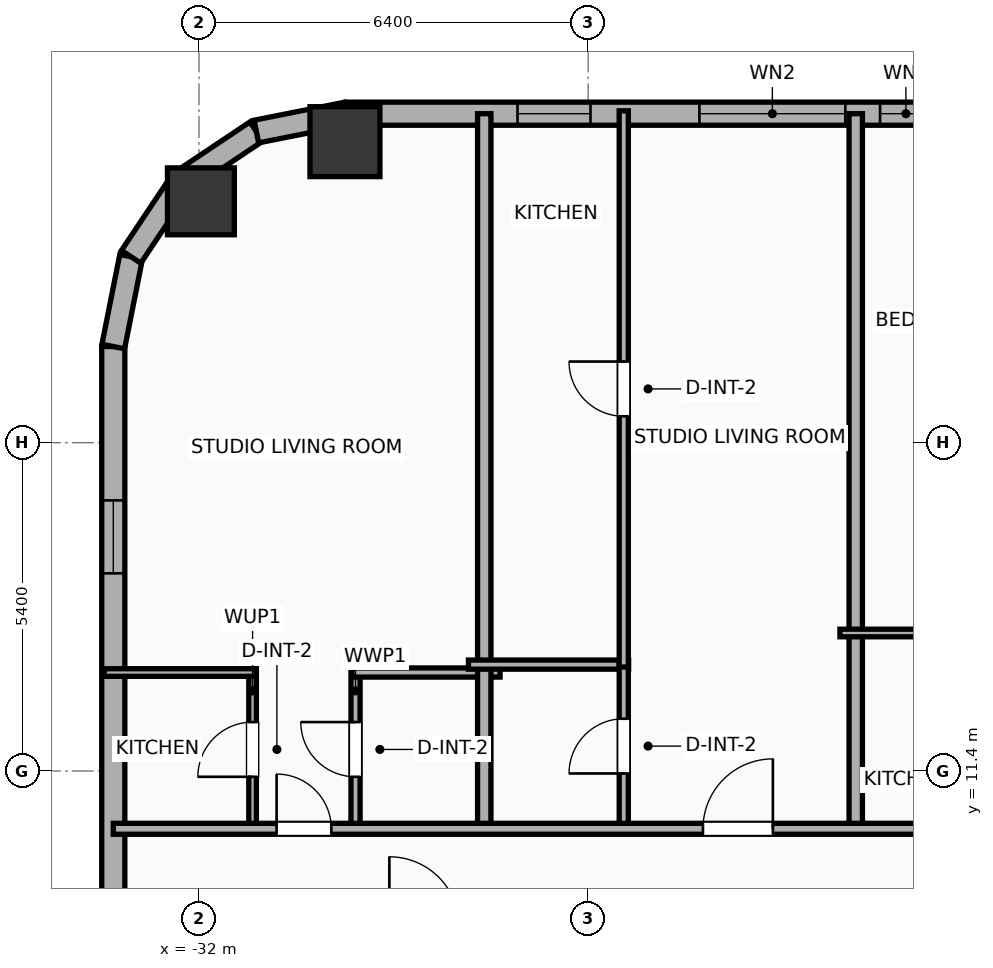
"""IFC4 building model, lengths in metres.
Left out: names, types, materials, properties, quantities, classifications, styles, units other than length and angle.
Written with IfcOpenShell. Run it as: python <this file> out.ifc"""

import sys

from ifc_helpers import new_model, si_unit, direction, frame, frame_2d, origin, origin_2d, place, context, subcontext, project, spatial, rectangle, hollow_rectangle, hollow_circle, extrude, element, fill, save


model = new_model("IFC4")
c1 = context("Model", 3, precision=1e-05, world=origin(), true_north=direction((0.0, 1.0)))
c2 = subcontext(c1, "Body", "Model", "MODEL_VIEW")
j1 = project(units=[si_unit("LENGTHUNIT", "METRE"), si_unit("PLANEANGLEUNIT", "RADIAN")], contexts=[c1])
p1 = place(None, origin())
s1 = spatial("IfcSite", under=j1, at=p1, CompositionType="ELEMENT")
p2 = place(p1, origin())
s2 = spatial("IfcBuilding", under=s1, at=p2, CompositionType="ELEMENT")
p3 = place(p2, frame((0.0, 0.0, 72.8)))
s3 = spatial("IfcBuildingStorey", under=s2, at=p3, CompositionType="ELEMENT", Elevation=72.8)
p4 = place(p3, frame((-29.6, 21.75, 0.0), z_axis=(0.0, 0.0, 1.0), x_axis=(1.0, 0.0, 0.0)))
e1 = element("IfcColumn", 1, at=p4, inside=s3, PredefinedType="COLUMN", context=c2, shape_type="SweptSolid", body=[
    extrude(hollow_rectangle(XDim=1.15, YDim=1.15, WallThickness=0.04, at=origin_2d()), origin(), (0.0, 0.0, 1.0), 3.9),
])
p5 = place(p3, frame((-31.969, 20.769, 0.0), z_axis=(0.0, 0.0, 1.0), x_axis=(1.0, 0.0, 0.0)))
e2 = element("IfcColumn", 2, at=p5, inside=s3, PredefinedType="COLUMN", context=c2, shape_type="SweptSolid", body=[
    extrude(hollow_circle(Radius=0.55, WallThickness=0.036, at=origin_2d()), origin(), (0.0, 0.0, 1.0), 3.9),
])
p6 = place(p3, frame((-33.41, -18.381, 0.0), z_axis=(0.0, 0.0, 1.0), x_axis=(0.0, 1.0, 0.0)))
e3 = element("IfcWall", 3, at=p6, inside=s3, PredefinedType="ELEMENTEDWALL", context=c2, shape_type="SweptSolid", body=[
    extrude(rectangle(XDim=36.763, YDim=0.38, at=frame_2d((18.381, 0.0))), origin(), (0.0, 0.0, 1.0), 3.65),
])
p7 = place(p6, frame((33.032, 0.0, 0.75)))
e4 = element("IfcOpeningElement", 4, at=p7, cuts=e3, PredefinedType="OPENING", context=c2, shape_type="SweptSolid", body=[
    extrude(rectangle(XDim=1.2, YDim=2.05, at=frame_2d((0.6, 1.025))), frame((0.0, 0.2, 0.0), z_axis=(0.0, -1.0, 0.0), x_axis=(1.0, 0.0, 0.0)), (0.0, 0.0, 1.0), 0.4),
])
p8 = place(p6, frame((22.301, 0.0, 0.75)))
e5 = element("IfcOpeningElement", 5, at=p8, cuts=e3, PredefinedType="OPENING", context=c2, shape_type="SweptSolid", body=[
    extrude(rectangle(XDim=1.2, YDim=2.05, at=frame_2d((0.6, 1.025))), frame((0.0, 0.2, 0.0), z_axis=(0.0, -1.0, 0.0), x_axis=(1.0, 0.0, 0.0)), (0.0, 0.0, 1.0), 0.4),
])
p9 = place(p6, frame((13.401, 0.0, 0.75)))
e6 = element("IfcOpeningElement", 6, at=p9, cuts=e3, PredefinedType="OPENING", context=c2, shape_type="SweptSolid", body=[
    extrude(rectangle(XDim=1.2, YDim=2.05, at=frame_2d((0.6, 1.025))), frame((0.0, 0.2, 0.0), z_axis=(0.0, -1.0, 0.0), x_axis=(1.0, 0.0, 0.0)), (0.0, 0.0, 1.0), 0.4),
])
p10 = place(p3, frame((-33.41, 18.381, 0.0), z_axis=(0.0, 0.0, 1.0), x_axis=(0.195086038585, 0.980786132421, 0.0)))
e7 = element("IfcWall", 7, at=p10, inside=s3, PredefinedType="ELEMENTEDWALL", context=c2, shape_type="SweptSolid", body=[
    extrude(rectangle(XDim=1.504, YDim=0.38, at=frame_2d((0.752, 0.0))), origin(), (0.0, 0.0, 1.0), 3.65),
])
p11 = place(p3, frame((-33.116, 19.857, 0.0), z_axis=(0.0, 0.0, 1.0), x_axis=(0.555572577804, 0.831468045563, 0.0)))
e8 = element("IfcWall", 8, at=p11, inside=s3, PredefinedType="ELEMENTEDWALL", context=c2, shape_type="SweptSolid", body=[
    extrude(rectangle(XDim=1.485, YDim=0.38, at=frame_2d((0.742, 0.0))), origin(), (0.0, 0.0, 1.0), 3.65),
])
p12 = place(p3, frame((-32.292, 21.091, 0.0), z_axis=(0.0, 0.0, 1.0), x_axis=(0.831442848281, 0.555610286119, 0.0)))
e9 = element("IfcWall", 9, at=p12, inside=s3, PredefinedType="ELEMENTEDWALL", context=c2, shape_type="SweptSolid", body=[
    extrude(rectangle(XDim=1.485, YDim=0.38, at=frame_2d((0.743, 0.0))), origin(), (0.0, 0.0, 1.0), 3.65),
])
p13 = place(p3, frame((-31.057, 21.917, 0.0), z_axis=(0.0, 0.0, 1.0), x_axis=(0.980786132421, 0.195086038585, 0.0)))
e10 = element("IfcWall", 10, at=p13, inside=s3, PredefinedType="ELEMENTEDWALL", context=c2, shape_type="SweptSolid", body=[
    extrude(rectangle(XDim=1.504, YDim=0.38, at=frame_2d((0.752, 0.0))), origin(), (0.0, 0.0, 1.0), 3.65),
])
p14 = place(p3, frame((-29.581, 22.21, 0.0), z_axis=(0.0, 0.0, 1.0), x_axis=(1.0, 0.0, 0.0)))
e11 = element("IfcWall", 11, at=p14, inside=s3, PredefinedType="ELEMENTEDWALL", context=c2, shape_type="SweptSolid", body=[
    extrude(rectangle(XDim=51.963, YDim=0.38, at=frame_2d((25.981, 0.0))), origin(), (0.0, 0.0, 1.0), 3.65),
])
p15 = place(p14, frame((5.81, 0.0, 0.75)))
e12 = element("IfcOpeningElement", 12, at=p15, cuts=e11, PredefinedType="OPENING", context=c2, shape_type="SweptSolid", body=[
    extrude(rectangle(XDim=2.4, YDim=2.1, at=frame_2d((1.2, 1.05))), frame((0.0, 0.2, 0.0), z_axis=(0.0, -1.0, 0.0), x_axis=(1.0, 0.0, 0.0)), (0.0, 0.0, 1.0), 0.4),
])
p16 = place(p14, frame((23.131, 0.0, 0.75)))
e13 = element("IfcOpeningElement", 13, at=p16, cuts=e11, PredefinedType="OPENING", context=c2, shape_type="SweptSolid", body=[
    extrude(rectangle(XDim=2.4, YDim=2.1, at=frame_2d((1.2, 1.05))), frame((0.0, 0.2, 0.0), z_axis=(0.0, -1.0, 0.0), x_axis=(1.0, 0.0, 0.0)), (0.0, 0.0, 1.0), 0.4),
])
p17 = place(p14, frame((43.752, 0.0, 0.75)))
e14 = element("IfcOpeningElement", 14, at=p17, cuts=e11, PredefinedType="OPENING", context=c2, shape_type="SweptSolid", body=[
    extrude(rectangle(XDim=2.4, YDim=2.1, at=frame_2d((1.2, 1.05))), frame((0.0, 0.2, 0.0), z_axis=(0.0, -1.0, 0.0), x_axis=(1.0, 0.0, 0.0)), (0.0, 0.0, 1.0), 0.4),
])
p18 = place(p14, frame((2.819, 0.0, 0.75)))
e15 = element("IfcOpeningElement", 15, at=p18, cuts=e11, PredefinedType="OPENING", context=c2, shape_type="SweptSolid", body=[
    extrude(rectangle(XDim=1.2, YDim=2.05, at=frame_2d((0.6, 1.025))), frame((0.0, 0.2, 0.0), z_axis=(0.0, -1.0, 0.0), x_axis=(1.0, 0.0, 0.0)), (0.0, 0.0, 1.0), 0.4),
])
p19 = place(p14, frame((11.781, 0.0, 0.75)))
e16 = element("IfcOpeningElement", 16, at=p19, cuts=e11, PredefinedType="OPENING", context=c2, shape_type="SweptSolid", body=[
    extrude(rectangle(XDim=1.2, YDim=2.05, at=frame_2d((0.6, 1.025))), frame((0.0, 0.2, 0.0), z_axis=(0.0, -1.0, 0.0), x_axis=(1.0, 0.0, 0.0)), (0.0, 0.0, 1.0), 0.4),
])
p20 = place(p14, frame((8.781, 0.0, 0.75)))
e17 = element("IfcOpeningElement", 17, at=p20, cuts=e11, PredefinedType="OPENING", context=c2, shape_type="SweptSolid", body=[
    extrude(rectangle(XDim=0.85, YDim=2.05, at=frame_2d((0.425, 1.025))), frame((0.0, 0.2, 0.0), z_axis=(0.0, -1.0, 0.0), x_axis=(1.0, 0.0, 0.0)), (0.0, 0.0, 1.0), 0.4),
])
p21 = place(p14, frame((14.876, 0.0, 0.75)))
e18 = element("IfcOpeningElement", 18, at=p21, cuts=e11, PredefinedType="OPENING", context=c2, shape_type="SweptSolid", body=[
    extrude(rectangle(XDim=1.2, YDim=2.05, at=frame_2d((0.6, 1.025))), frame((0.0, 0.2, 0.0), z_axis=(0.0, -1.0, 0.0), x_axis=(1.0, 0.0, 0.0)), (0.0, 0.0, 1.0), 0.4),
])
p22 = place(p14, frame((21.521, 0.0, 0.75)))
e19 = element("IfcOpeningElement", 19, at=p22, cuts=e11, PredefinedType="OPENING", context=c2, shape_type="SweptSolid", body=[
    extrude(rectangle(XDim=0.52, YDim=2.05, at=frame_2d((0.26, 1.025))), frame((0.0, 0.2, 0.0), z_axis=(0.0, -1.0, 0.0), x_axis=(1.0, 0.0, 0.0)), (0.0, 0.0, 1.0), 0.4),
])
p23 = place(p14, frame((17.886, 0.0, 0.75)))
e20 = element("IfcOpeningElement", 20, at=p23, cuts=e11, PredefinedType="OPENING", context=c2, shape_type="SweptSolid", body=[
    extrude(rectangle(XDim=1.2, YDim=2.05, at=frame_2d((0.6, 1.025))), frame((0.0, 0.2, 0.0), z_axis=(0.0, -1.0, 0.0), x_axis=(1.0, 0.0, 0.0)), (0.0, 0.0, 1.0), 0.4),
])
p24 = place(p14, frame((26.736, 0.0, 0.75)))
e21 = element("IfcOpeningElement", 21, at=p24, cuts=e11, PredefinedType="OPENING", context=c2, shape_type="SweptSolid", body=[
    extrude(rectangle(XDim=1.2, YDim=2.05, at=frame_2d((0.6, 1.025))), frame((0.0, 0.2, 0.0), z_axis=(0.0, -1.0, 0.0), x_axis=(1.0, 0.0, 0.0)), (0.0, 0.0, 1.0), 0.4),
])
p25 = place(p14, frame((31.976, 0.0, 0.75)))
e22 = element("IfcOpeningElement", 22, at=p25, cuts=e11, PredefinedType="OPENING", context=c2, shape_type="SweptSolid", body=[
    extrude(rectangle(XDim=1.2, YDim=2.05, at=frame_2d((0.6, 1.025))), frame((0.0, 0.2, 0.0), z_axis=(0.0, -1.0, 0.0), x_axis=(1.0, 0.0, 0.0)), (0.0, 0.0, 1.0), 0.4),
])
p26 = place(p14, frame((38.181, 0.0, 0.75)))
e23 = element("IfcOpeningElement", 23, at=p26, cuts=e11, PredefinedType="OPENING", context=c2, shape_type="SweptSolid", body=[
    extrude(rectangle(XDim=1.2, YDim=2.05, at=frame_2d((0.6, 1.025))), frame((0.0, 0.2, 0.0), z_axis=(0.0, -1.0, 0.0), x_axis=(1.0, 0.0, 0.0)), (0.0, 0.0, 1.0), 0.4),
])
p27 = place(p14, frame((35.486, 0.0, 0.75)))
e24 = element("IfcOpeningElement", 24, at=p27, cuts=e11, PredefinedType="OPENING", context=c2, shape_type="SweptSolid", body=[
    extrude(rectangle(XDim=1.2, YDim=2.05, at=frame_2d((0.6, 1.025))), frame((0.0, 0.2, 0.0), z_axis=(0.0, -1.0, 0.0), x_axis=(1.0, 0.0, 0.0)), (0.0, 0.0, 1.0), 0.4),
])
p28 = place(p14, frame((42.411, 0.0, 0.75)))
e25 = element("IfcOpeningElement", 25, at=p28, cuts=e11, PredefinedType="OPENING", context=c2, shape_type="SweptSolid", body=[
    extrude(rectangle(XDim=0.85, YDim=2.05, at=frame_2d((0.425, 1.025))), frame((0.0, 0.2, 0.0), z_axis=(0.0, -1.0, 0.0), x_axis=(1.0, 0.0, 0.0)), (0.0, 0.0, 1.0), 0.4),
])
p29 = place(p14, frame((47.943, 0.0, 0.75)))
e26 = element("IfcOpeningElement", 26, at=p29, cuts=e11, PredefinedType="OPENING", context=c2, shape_type="SweptSolid", body=[
    extrude(rectangle(XDim=1.2, YDim=2.05, at=frame_2d((0.6, 1.025))), frame((0.0, 0.2, 0.0), z_axis=(0.0, -1.0, 0.0), x_axis=(1.0, 0.0, 0.0)), (0.0, 0.0, 1.0), 0.4),
])
p30 = place(p14, frame((49.901, 0.0, 0.75)))
e27 = element("IfcOpeningElement", 27, at=p30, cuts=e11, PredefinedType="OPENING", context=c2, shape_type="SweptSolid", body=[
    extrude(rectangle(XDim=1.2, YDim=2.05, at=frame_2d((0.6, 1.025))), frame((0.0, 0.2, 0.0), z_axis=(0.0, -1.0, 0.0), x_axis=(1.0, 0.0, 0.0)), (0.0, 0.0, 1.0), 0.4),
])
p31 = place(p3, frame((-31.119, 10.43, 0.0), z_axis=(0.0, 0.0, 1.0), x_axis=(0.0, 1.0, 0.0)))
e28 = element("IfcWall", 28, at=p31, inside=s3, PredefinedType="PARTITIONING", context=c2, shape_type="SweptSolid", body=[
    extrude(rectangle(XDim=2.65, YDim=0.125, at=frame_2d((1.325, 0.0))), origin(), (0.0, 0.0, 1.0), 3.65),
])
p32 = place(p31, frame((0.875, 0.0, 0.0)))
e29 = element("IfcOpeningElement", 29, at=p32, cuts=e28, PredefinedType="OPENING", context=c2, shape_type="SweptSolid", body=[
    extrude(rectangle(XDim=0.9, YDim=2.05, at=frame_2d((0.45, 1.025))), frame((0.0, 0.073, 0.0), z_axis=(0.0, -1.0, 0.0), x_axis=(1.0, 0.0, 0.0)), (0.0, 0.0, 1.0), 0.145),
])
p33 = place(p3, frame((-29.426, 10.43, 0.0), z_axis=(0.0, 0.0, 1.0), x_axis=(0.0, 1.0, 0.0)))
e30 = element("IfcWall", 30, at=p33, inside=s3, PredefinedType="PLUMBINGWALL", context=c2, shape_type="SweptSolid", body=[
    extrude(rectangle(XDim=2.65, YDim=0.15, at=frame_2d((1.325, 0.0))), origin(), (0.0, 0.0, 1.0), 3.65),
])
p34 = place(p33, frame((0.875, 0.0, 0.0)))
e31 = element("IfcOpeningElement", 31, at=p34, cuts=e30, PredefinedType="OPENING", context=c2, shape_type="SweptSolid", body=[
    extrude(rectangle(XDim=0.9, YDim=2.05, at=frame_2d((0.45, 1.025))), frame((0.0, 0.085, 0.0), z_axis=(0.0, -1.0, 0.0), x_axis=(1.0, 0.0, 0.0)), (0.0, 0.0, 1.0), 0.17),
])
p35 = place(p3, frame((-33.56, 13.02, 0.0), z_axis=(0.0, 0.0, 1.0), x_axis=(1.0, 0.0, 0.0)))
e32 = element("IfcWall", 32, at=p35, inside=s3, PredefinedType="PARTITIONING", context=c2, shape_type="SweptSolid", body=[
    extrude(rectangle(XDim=2.501, YDim=0.125, at=frame_2d((1.25, 0.0))), origin(), (0.0, 0.0, 1.0), 3.65),
])
p36 = place(p3, frame((-29.486, 13.02, 0.0), z_axis=(0.0, 0.0, 1.0), x_axis=(1.0, 0.0, 0.0)))
e33 = element("IfcWall", 33, at=p36, inside=s3, PredefinedType="PLUMBINGWALL", context=c2, shape_type="SweptSolid", body=[
    extrude(rectangle(XDim=2.437, YDim=0.15, at=frame_2d((1.219, 0.0))), origin(), (0.0, 0.0, 1.0), 3.65),
])
p37 = place(p3, frame((-27.309, 10.37, 0.0), z_axis=(0.0, 0.0, 1.0), x_axis=(0.0, 1.0, 0.0)))
e34 = element("IfcWall", 34, at=p37, inside=s3, PredefinedType="PARTITIONING", context=c2, shape_type="SweptSolid", body=[
    extrude(rectangle(XDim=11.84, YDim=0.22, at=frame_2d((5.92, 0.0))), origin(), (0.0, 0.0, 1.0), 3.65),
])
p38 = place(p3, frame((-27.569, 13.15, 0.0), z_axis=(0.0, 0.0, 1.0), x_axis=(1.0, 0.0, 0.0)))
e35 = element("IfcWall", 35, at=p38, inside=s3, PredefinedType="PLUMBINGWALL", context=c2, shape_type="SweptSolid", body=[
    extrude(rectangle(XDim=2.634, YDim=0.15, at=frame_2d((1.317, 0.0))), origin(), (0.0, 0.0, 1.0), 3.65),
])
p39 = place(p3, frame((-25.015, 10.43, 0.0), z_axis=(0.0, 0.0, 1.0), x_axis=(0.0, 1.0, 0.0)))
e36 = element("IfcWall", 36, at=p39, inside=s3, PredefinedType="PLUMBINGWALL", context=c2, shape_type="SweptSolid", body=[
    extrude(rectangle(XDim=2.76, YDim=0.15, at=frame_2d((1.38, 0.0))), origin(), (0.0, 0.0, 1.0), 3.65),
])
p40 = place(p39, frame((0.93, 0.0, 0.0)))
e37 = element("IfcOpeningElement", 37, at=p40, cuts=e36, PredefinedType="OPENING", context=c2, shape_type="SweptSolid", body=[
    extrude(rectangle(XDim=0.9, YDim=2.05, at=frame_2d((0.45, 1.025))), frame((0.0, 0.085, 0.0), z_axis=(0.0, -1.0, 0.0), x_axis=(1.0, 0.0, 0.0)), (0.0, 0.0, 1.0), 0.17),
])
p41 = place(p3, frame((-25.015, 13.11, 0.0), z_axis=(0.0, 0.0, 1.0), x_axis=(0.0, 1.0, 0.0)))
e38 = element("IfcWall", 38, at=p41, inside=s3, PredefinedType="PLUMBINGWALL", context=c2, shape_type="SweptSolid", body=[
    extrude(rectangle(XDim=9.147, YDim=0.15, at=frame_2d((4.574, 0.0))), origin(), (0.0, 0.0, 1.0), 3.65),
])
p42 = place(p41, frame((4.124, 0.0, 0.0)))
e39 = element("IfcOpeningElement", 39, at=p42, cuts=e38, PredefinedType="OPENING", context=c2, shape_type="SweptSolid", body=[
    extrude(rectangle(XDim=0.9, YDim=2.05, at=frame_2d((0.45, 1.025))), frame((0.0, 0.085, 0.0), z_axis=(0.0, -1.0, 0.0), x_axis=(1.0, 0.0, 0.0)), (0.0, 0.0, 1.0), 0.17),
])
p43 = place(p3, frame((-21.2, 10.37, 0.0), z_axis=(0.0, 0.0, 1.0), x_axis=(0.0, 1.0, 0.0)))
e40 = element("IfcWall", 40, at=p43, inside=s3, PredefinedType="PARTITIONING", context=c2, shape_type="SweptSolid", body=[
    extrude(rectangle(XDim=11.84, YDim=0.22, at=frame_2d((5.92, 0.0))), origin(), (0.0, 0.0, 1.0), 3.65),
])
p44 = place(p3, frame((-21.46, 13.67, 0.0), z_axis=(0.0, 0.0, 1.0), x_axis=(1.0, 0.0, 0.0)))
e41 = element("IfcWall", 41, at=p44, inside=s3, PredefinedType="PARTITIONING", context=c2, shape_type="SweptSolid", body=[
    extrude(rectangle(XDim=2.99, YDim=0.125, at=frame_2d((1.495, 0.0))), origin(), (0.0, 0.0, 1.0), 3.65),
])
p45 = place(p3, frame((-33.41, 10.45, 0.0), z_axis=(0.0, 0.0, 1.0), x_axis=(1.0, 0.0, 0.0)))
e42 = element("IfcWall", 42, at=p45, inside=s3, PredefinedType="PARTITIONING", context=c2, shape_type="SweptSolid", body=[
    extrude(rectangle(XDim=59.62, YDim=0.18, at=frame_2d((29.81, 0.0))), origin(), (0.0, 0.0, 1.0), 3.65),
])
p46 = place(p45, frame((2.686, 0.0, 0.0)))
e43 = element("IfcOpeningElement", 43, at=p46, cuts=e42, PredefinedType="OPENING", context=c2, shape_type="SweptSolid", body=[
    extrude(rectangle(XDim=0.9, YDim=2.05, at=frame_2d((0.45, 1.025))), frame((0.0, 0.1, 0.0), z_axis=(0.0, -1.0, 0.0), x_axis=(1.0, 0.0, 0.0)), (0.0, 0.0, 1.0), 0.2),
])
p47 = place(p45, frame((9.698, 0.0, 0.0)))
e44 = element("IfcOpeningElement", 44, at=p47, cuts=e42, PredefinedType="OPENING", context=c2, shape_type="SweptSolid", body=[
    extrude(rectangle(XDim=1.15, YDim=2.05, at=frame_2d((0.575, 1.025))), frame((0.0, 0.1, 0.0), z_axis=(0.0, -1.0, 0.0), x_axis=(1.0, 0.0, 0.0)), (0.0, 0.0, 1.0), 0.2),
])
p48 = place(p45, frame((16.22, 0.0, 0.0)))
e45 = element("IfcOpeningElement", 45, at=p48, cuts=e42, PredefinedType="OPENING", context=c2, shape_type="SweptSolid", body=[
    extrude(rectangle(XDim=1.15, YDim=2.05, at=frame_2d((0.575, 1.025))), frame((0.0, 0.1, 0.0), z_axis=(0.0, -1.0, 0.0), x_axis=(1.0, 0.0, 0.0)), (0.0, 0.0, 1.0), 0.2),
])
p49 = place(p45, frame((25.073, 0.0, 0.0)))
e46 = element("IfcOpeningElement", 46, at=p49, cuts=e42, PredefinedType="OPENING", context=c2, shape_type="SweptSolid", body=[
    extrude(rectangle(XDim=1.15, YDim=2.05, at=frame_2d((0.575, 1.025))), frame((0.0, 0.1, 0.0), z_axis=(0.0, -1.0, 0.0), x_axis=(1.0, 0.0, 0.0)), (0.0, 0.0, 1.0), 0.2),
])
p50 = place(p45, frame((33.605, 0.0, 0.0)))
e47 = element("IfcOpeningElement", 47, at=p50, cuts=e42, PredefinedType="OPENING", context=c2, shape_type="SweptSolid", body=[
    extrude(rectangle(XDim=1.15, YDim=2.05, at=frame_2d((0.575, 1.025))), frame((0.0, 0.1, 0.0), z_axis=(0.0, -1.0, 0.0), x_axis=(1.0, 0.0, 0.0)), (0.0, 0.0, 1.0), 0.2),
])
p51 = place(p45, frame((42.649, 0.0, 0.0)))
e48 = element("IfcOpeningElement", 48, at=p51, cuts=e42, PredefinedType="OPENING", context=c2, shape_type="SweptSolid", body=[
    extrude(rectangle(XDim=1.15, YDim=2.05, at=frame_2d((0.575, 1.025))), frame((0.0, 0.1, 0.0), z_axis=(0.0, -1.0, 0.0), x_axis=(1.0, 0.0, 0.0)), (0.0, 0.0, 1.0), 0.2),
])
p52 = place(p45, frame((48.772, 0.0, 0.0)))
e49 = element("IfcOpeningElement", 49, at=p52, cuts=e42, PredefinedType="OPENING", context=c2, shape_type="SweptSolid", body=[
    extrude(rectangle(XDim=1.15, YDim=2.05, at=frame_2d((0.575, 1.025))), frame((0.0, 0.1, 0.0), z_axis=(0.0, -1.0, 0.0), x_axis=(1.0, 0.0, 0.0)), (0.0, 0.0, 1.0), 0.2),
])
p53 = place(p45, frame((56.272, 0.0, 0.0)))
e50 = element("IfcOpeningElement", 50, at=p53, cuts=e42, PredefinedType="OPENING", context=c2, shape_type="SweptSolid", body=[
    extrude(rectangle(XDim=0.9, YDim=2.05, at=frame_2d((0.45, 1.025))), frame((0.0, 0.1, 0.0), z_axis=(0.0, -1.0, 0.0), x_axis=(1.0, 0.0, 0.0)), (0.0, 0.0, 1.0), 0.2),
])
p54 = place(p15, origin())
e51 = element("IfcWindow", 51, at=p54, inside=s3, PartitioningType="SINGLE_PANEL", PredefinedType="WINDOW", context=c2, shape_type="SweptSolid", body=[
    extrude(rectangle(XDim=2.4, YDim=2.1, at=frame_2d((1.2, 1.05))), frame((0.0, 0.03, 0.0), z_axis=(0.0, -1.0, 0.0), x_axis=(1.0, 0.0, 0.0)), (0.0, 0.0, 1.0), 0.06),
])
fill(e12, e51)
p55 = place(p7, origin())
e52 = element("IfcWindow", 52, at=p55, inside=s3, PartitioningType="SINGLE_PANEL", PredefinedType="WINDOW", context=c2, shape_type="SweptSolid", body=[
    extrude(rectangle(XDim=1.2, YDim=2.05, at=frame_2d((0.6, 1.025))), frame((0.0, 0.03, 0.0), z_axis=(0.0, -1.0, 0.0), x_axis=(1.0, 0.0, 0.0)), (0.0, 0.0, 1.0), 0.06),
])
fill(e4, e52)
p56 = place(p18, origin())
e53 = element("IfcWindow", 53, at=p56, inside=s3, PartitioningType="SINGLE_PANEL", PredefinedType="WINDOW", context=c2, shape_type="SweptSolid", body=[
    extrude(rectangle(XDim=1.2, YDim=2.05, at=frame_2d((0.6, 1.025))), frame((0.0, 0.03, 0.0), z_axis=(0.0, -1.0, 0.0), x_axis=(1.0, 0.0, 0.0)), (0.0, 0.0, 1.0), 0.06),
])
fill(e15, e53)
p57 = place(p20, origin())
e54 = element("IfcWindow", 54, at=p57, inside=s3, PartitioningType="SINGLE_PANEL", PredefinedType="WINDOW", context=c2, shape_type="SweptSolid", body=[
    extrude(rectangle(XDim=0.85, YDim=2.05, at=frame_2d((0.425, 1.025))), frame((0.0, 0.03, 0.0), z_axis=(0.0, -1.0, 0.0), x_axis=(1.0, 0.0, 0.0)), (0.0, 0.0, 1.0), 0.06),
])
fill(e17, e54)
p58 = place(p32, origin())
e55 = element("IfcDoor", 55, at=p58, inside=s3, OperationType="SINGLE_SWING_LEFT", PredefinedType="DOOR", context=c2, shape_type="SweptSolid", body=[
    extrude(rectangle(XDim=0.9, YDim=2.05, at=frame_2d((0.45, 1.025))), frame((0.0, 0.025, 0.0), z_axis=(0.0, -1.0, 0.0), x_axis=(1.0, 0.0, 0.0)), (0.0, 0.0, 1.0), 0.05),
])
fill(e29, e55)
p59 = place(p34, origin())
e56 = element("IfcDoor", 56, at=p59, inside=s3, OperationType="SINGLE_SWING_RIGHT", PredefinedType="DOOR", context=c2, shape_type="SweptSolid", body=[
    extrude(rectangle(XDim=0.9, YDim=2.05, at=frame_2d((0.45, 1.025))), frame((0.0, 0.025, 0.0), z_axis=(0.0, -1.0, 0.0), x_axis=(1.0, 0.0, 0.0)), (0.0, 0.0, 1.0), 0.05),
])
fill(e31, e56)
p60 = place(p40, origin())
e57 = element("IfcDoor", 57, at=p60, inside=s3, OperationType="SINGLE_SWING_LEFT", PredefinedType="DOOR", context=c2, shape_type="SweptSolid", body=[
    extrude(rectangle(XDim=0.9, YDim=2.05, at=frame_2d((0.45, 1.025))), frame((0.0, 0.025, 0.0), z_axis=(0.0, -1.0, 0.0), x_axis=(1.0, 0.0, 0.0)), (0.0, 0.0, 1.0), 0.05),
])
fill(e37, e57)
p61 = place(p42, origin())
e58 = element("IfcDoor", 58, at=p61, inside=s3, OperationType="SINGLE_SWING_RIGHT", PredefinedType="DOOR", context=c2, shape_type="SweptSolid", body=[
    extrude(rectangle(XDim=0.9, YDim=2.05, at=frame_2d((0.45, 1.025))), frame((0.0, 0.025, 0.0), z_axis=(0.0, -1.0, 0.0), x_axis=(1.0, 0.0, 0.0)), (0.0, 0.0, 1.0), 0.05),
])
fill(e39, e58)
p62 = place(p46, origin())
e59 = element("IfcDoor", 59, at=p62, inside=s3, OperationType="SINGLE_SWING_LEFT", PredefinedType="DOOR", context=c2, shape_type="SweptSolid", body=[
    extrude(rectangle(XDim=0.9, YDim=2.05, at=frame_2d((0.45, 1.025))), frame((0.0, 0.025, 0.0), z_axis=(0.0, -1.0, 0.0), x_axis=(1.0, 0.0, 0.0)), (0.0, 0.0, 1.0), 0.05),
])
fill(e43, e59)
p63 = place(p47, origin())
e60 = element("IfcDoor", 60, at=p63, inside=s3, OperationType="SINGLE_SWING_RIGHT", PredefinedType="DOOR", context=c2, shape_type="SweptSolid", body=[
    extrude(rectangle(XDim=1.15, YDim=2.05, at=frame_2d((0.575, 1.025))), frame((0.0, 0.025, 0.0), z_axis=(0.0, -1.0, 0.0), x_axis=(1.0, 0.0, 0.0)), (0.0, 0.0, 1.0), 0.05),
])
fill(e44, e60)
save(model, sys.argv[1])
